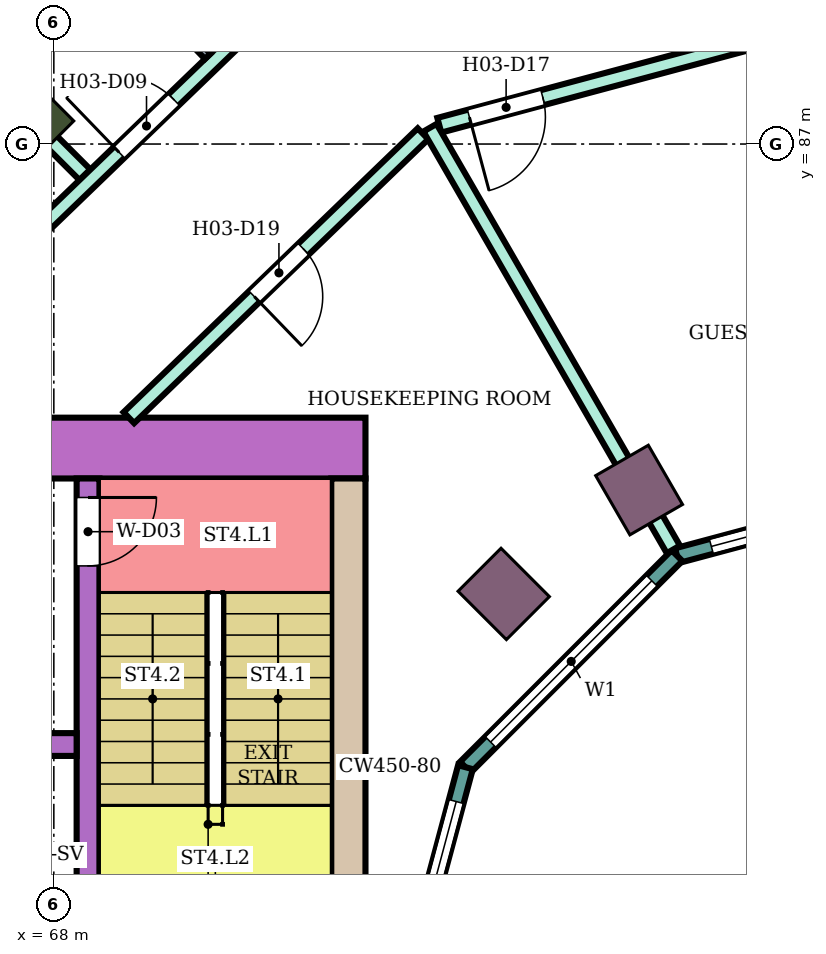
"""IFC4 building model, lengths in metres.
Left out: names, types, materials, properties, quantities, classifications, styles, units other than length and angle.
Written with IfcOpenShell. Run it as: python <this file> out.ifc"""

import sys

from ifc_helpers import new_model, si_unit, direction, frame, frame_2d, origin, origin_2d, place, context, subcontext, project, spatial, rectangle, extrude, element, fill, save


model = new_model("IFC4")
c1 = context("Model", 3, precision=1e-05, world=origin(), true_north=direction((0.0, 1.0)))
c2 = subcontext(c1, "Body", "Model", "MODEL_VIEW")
j1 = project(units=[si_unit("LENGTHUNIT", "METRE"), si_unit("PLANEANGLEUNIT", "RADIAN")], contexts=[c1])
p1 = place(None, origin())
s1 = spatial("IfcSite", under=j1, at=p1, CompositionType="ELEMENT")
p2 = place(p1, origin())
s2 = spatial("IfcBuilding", under=s1, at=p2, CompositionType="ELEMENT")
p3 = place(p2, frame((0.0, 0.0, 59.2)))
s3 = spatial("IfcBuildingStorey", under=s2, at=p3, CompositionType="ELEMENT", Elevation=59.2)
p4 = place(p3, frame((67.555, 87.445, 0.0), z_axis=(0.0, 0.0, 1.0), x_axis=(-0.707106781187, 0.707106781187, 0.0)))
e1 = element("IfcColumn", 1, at=p4, inside=s3, PredefinedType="COLUMN", context=c2, shape_type="SweptSolid", body=[
    extrude(rectangle(XDim=1.2, YDim=0.8, at=origin_2d()), origin(), (0.0, 0.0, 1.0), 3.8),
])
for number, where, z_axis, x_axis in (
    (2, (75.7, 82.448, 0.0), (0.0, 0.0, 1.0), (-0.5, 0.866, 0.0)),
    (3, (73.919, 81.081, 0.0), (0.0, 0.0, 1.0), (-0.707, 0.707, 0.0)),
):
    element("IfcColumn", number, at=place(p3, frame(where, z_axis=z_axis, x_axis=x_axis)), inside=s3, PredefinedType="COLUMN", context=c2, shape_type="SweptSolid", body=[
        extrude(rectangle(XDim=0.9, YDim=0.8, at=origin_2d()), origin(), (0.0, 0.0, 1.0), 3.8),
    ])
p5 = place(p3, frame((72.1, 83.0, 0.0), z_axis=(0.0, 0.0, 1.0), x_axis=(-1.0, 0.0, 0.0)))
e4 = element("IfcWall", 4, at=p5, inside=s3, PredefinedType="SHEAR", context=c2, shape_type="SweptSolid", body=[
    extrude(rectangle(XDim=14.7, YDim=0.8, at=frame_2d((7.35, 0.0))), origin(), (0.0, 0.0, 1.0), 3.48),
])
p6 = place(p5, frame((4.2, 0.0, 0.0)))
e5 = element("IfcOpeningElement", 5, at=p6, cuts=e4, PredefinedType="OPENING", context=c2, shape_type="SweptSolid", body=[
    extrude(rectangle(XDim=2.4, YDim=2.4, at=frame_2d((1.2, 1.2))), frame((0.0, 0.41, 0.0), z_axis=(0.0, -1.0, 0.0), x_axis=(1.0, 0.0, 0.0)), (0.0, 0.0, 1.0), 0.82),
])
p7 = place(p3, frame((71.875, 82.6, 0.0), z_axis=(0.0, 0.0, 1.0), x_axis=(0.0, -1.0, 0.0)))
e6 = element("IfcWall", 6, at=p7, inside=s3, PredefinedType="SHEAR", context=c2, shape_type="SweptSolid", body=[
    extrude(rectangle(XDim=7.6, YDim=0.45, at=frame_2d((3.8, 0.0))), origin(), (0.0, 0.0, 1.0), 3.48),
])
p8 = place(p3, frame((68.45, 82.6, 0.0), z_axis=(0.0, 0.0, 1.0), x_axis=(0.0, -1.0, 0.0)))
e7 = element("IfcWall", 7, at=p8, inside=s3, PredefinedType="SHEAR", context=c2, shape_type="SweptSolid", body=[
    extrude(rectangle(XDim=7.6, YDim=0.3, at=frame_2d((3.8, 0.0))), origin(), (0.0, 0.0, 1.0), 3.48),
])
p9 = place(p8, frame((0.25, 0.0, 0.0)))
e8 = element("IfcOpeningElement", 8, at=p9, cuts=e7, PredefinedType="OPENING", context=c2, shape_type="SweptSolid", body=[
    extrude(rectangle(XDim=0.9, YDim=2.1, at=frame_2d((0.45, 1.05))), frame((0.0, 0.16, 0.0), z_axis=(0.0, -1.0, 0.0), x_axis=(1.0, 0.0, 0.0)), (0.0, 0.0, 1.0), 0.32),
])
p10 = place(p3, frame((68.3, 79.1, 0.0), z_axis=(0.0, 0.0, 1.0), x_axis=(-1.0, 0.0, 0.0)))
e9 = element("IfcWall", 9, at=p10, inside=s3, PredefinedType="SHEAR", context=c2, shape_type="SweptSolid", body=[
    extrude(rectangle(XDim=10.9, YDim=0.3, at=frame_2d((5.45, 0.0))), origin(), (0.0, 0.0, 1.0), 3.48),
])
p11 = place(p10, frame((0.4, 0.0, 0.0)))
e10 = element("IfcOpeningElement", 10, at=p11, cuts=e9, PredefinedType="OPENING", context=c2, shape_type="SweptSolid", body=[
    extrude(rectangle(XDim=1.4, YDim=2.1, at=frame_2d((0.7, 1.05))), frame((0.0, 0.16, 0.0), z_axis=(0.0, -1.0, 0.0), x_axis=(1.0, 0.0, 0.0)), (0.0, 0.0, 1.0), 0.32),
])
p12 = place(p10, frame((5.4, 0.0, 0.0)))
e11 = element("IfcOpeningElement", 11, at=p12, cuts=e9, PredefinedType="OPENING", context=c2, shape_type="SweptSolid", body=[
    extrude(rectangle(XDim=1.4, YDim=2.1, at=frame_2d((0.7, 1.05))), frame((0.0, 0.16, 0.0), z_axis=(0.0, -1.0, 0.0), x_axis=(1.0, 0.0, 0.0)), (0.0, 0.0, 1.0), 0.32),
])
p13 = place(p10, frame((8.1, 0.0, 0.0)))
e12 = element("IfcOpeningElement", 12, at=p13, cuts=e9, PredefinedType="OPENING", context=c2, shape_type="SweptSolid", body=[
    extrude(rectangle(XDim=1.0, YDim=2.1, at=frame_2d((0.5, 1.05))), frame((0.0, 0.16, 0.0), z_axis=(0.0, -1.0, 0.0), x_axis=(1.0, 0.0, 0.0)), (0.0, 0.0, 1.0), 0.32),
])
p14 = place(p3, frame((80.0, 82.604, 0.0), z_axis=(0.0, 0.0, 1.0), x_axis=(-0.965933654434, -0.258789828301, 0.0)))
e13 = element("IfcWall", 13, at=p14, inside=s3, PredefinedType="NOTDEFINED", context=c2, shape_type="SweptSolid", body=[
    extrude(rectangle(XDim=3.936, YDim=0.2, at=frame_2d((1.968, 0.0))), origin(), (0.0, 0.0, 1.0), 3.8),
])
p15 = place(p14, frame((0.468, 0.0, 0.9)))
e14 = element("IfcOpeningElement", 14, at=p15, cuts=e13, PredefinedType="OPENING", context=c2, shape_type="SweptSolid", body=[
    extrude(rectangle(XDim=3.0, YDim=2.3, at=frame_2d((1.5, 1.15))), frame((0.0, 0.11, 0.0), z_axis=(0.0, -1.0, 0.0), x_axis=(1.0, 0.0, 0.0)), (0.0, 0.0, 1.0), 0.22),
])
p16 = place(p3, frame((76.198, 81.585, 0.0), z_axis=(0.0, 0.0, 1.0), x_axis=(-0.707106781187, -0.707106781187, 0.0)))
e15 = element("IfcWall", 15, at=p16, inside=s3, PredefinedType="NOTDEFINED", context=c2, shape_type="SweptSolid", body=[
    extrude(rectangle(XDim=3.936, YDim=0.2, at=frame_2d((1.968, 0.0))), origin(), (0.0, 0.0, 1.0), 3.8),
])
p17 = place(p16, frame((0.468, 0.0, 0.9)))
e16 = element("IfcOpeningElement", 16, at=p17, cuts=e15, PredefinedType="OPENING", context=c2, shape_type="SweptSolid", body=[
    extrude(rectangle(XDim=3.0, YDim=2.3, at=frame_2d((1.5, 1.15))), frame((0.0, 0.11, 0.0), z_axis=(0.0, -1.0, 0.0), x_axis=(1.0, 0.0, 0.0)), (0.0, 0.0, 1.0), 0.22),
])
p18 = place(p3, frame((73.415, 78.802, 0.0), z_axis=(0.0, 0.0, 1.0), x_axis=(-0.258789828301, -0.965933654434, 0.0)))
e17 = element("IfcWall", 17, at=p18, inside=s3, PredefinedType="NOTDEFINED", context=c2, shape_type="SweptSolid", body=[
    extrude(rectangle(XDim=3.936, YDim=0.2, at=frame_2d((1.968, 0.0))), origin(), (0.0, 0.0, 1.0), 3.8),
])
p19 = place(p18, frame((0.468, 0.0, 0.9)))
e18 = element("IfcOpeningElement", 18, at=p19, cuts=e17, PredefinedType="OPENING", context=c2, shape_type="SweptSolid", body=[
    extrude(rectangle(XDim=3.0, YDim=2.3, at=frame_2d((1.5, 1.15))), frame((0.0, 0.11, 0.0), z_axis=(0.0, -1.0, 0.0), x_axis=(1.0, 0.0, 0.0)), (0.0, 0.0, 1.0), 0.22),
])
p20 = place(p3, frame((63.598, 91.408, 0.0), z_axis=(0.0, 0.0, 1.0), x_axis=(0.706999146394, -0.707214399597, 0.0)))
e19 = element("IfcWall", 19, at=p20, inside=s3, PredefinedType="PARTITIONING", context=c2, shape_type="SweptSolid", body=[
    extrude(rectangle(XDim=6.805, YDim=0.2, at=frame_2d((3.403, 0.0))), origin(), (0.0, 0.0, 1.0), 3.35),
])
p21 = place(p3, frame((66.797, 84.9, 0.0), z_axis=(0.0, 0.0, 1.0), x_axis=(0.719692092412, 0.694293376116, 0.0)))
e20 = element("IfcWall", 20, at=p21, inside=s3, PredefinedType="PARTITIONING", context=c2, shape_type="SweptSolid", body=[
    extrude(rectangle(XDim=6.584, YDim=0.2, at=frame_2d((3.292, 0.0))), origin(), (0.0, 0.0, 1.0), 3.35),
])
p22 = place(p21, frame((2.866, 0.0, 0.0)))
e21 = element("IfcOpeningElement", 21, at=p22, cuts=e20, PredefinedType="OPENING", context=c2, shape_type="SweptSolid", body=[
    extrude(rectangle(XDim=1.0, YDim=2.1, at=frame_2d((0.5, 1.05))), frame((0.0, 0.11, 0.0), z_axis=(0.0, -1.0, 0.0), x_axis=(1.0, 0.0, 0.0)), (0.0, 0.0, 1.0), 0.22),
])
p23 = place(p3, frame((68.987, 83.4, 0.0), z_axis=(0.0, 0.0, 1.0), x_axis=(0.719547721855, 0.694442996922, 0.0)))
e22 = element("IfcWall", 22, at=p23, inside=s3, PredefinedType="PARTITIONING", context=c2, shape_type="SweptSolid", body=[
    extrude(rectangle(XDim=5.378, YDim=0.2, at=frame_2d((2.689, 0.0))), origin(), (0.0, 0.0, 1.0), 3.35),
])
p24 = place(p23, frame((2.294, 0.0, 0.0)))
e23 = element("IfcOpeningElement", 23, at=p24, cuts=e22, PredefinedType="OPENING", context=c2, shape_type="SweptSolid", body=[
    extrude(rectangle(XDim=0.9, YDim=2.1, at=frame_2d((0.45, 1.05))), frame((0.0, 0.11, 0.0), z_axis=(0.0, -1.0, 0.0), x_axis=(1.0, 0.0, 0.0)), (0.0, 0.0, 1.0), 0.22),
])
p25 = place(p3, frame((73.071, 87.247, 0.0), z_axis=(0.0, 0.0, 1.0), x_axis=(0.965931651205, 0.258797305243, 0.0)))
e24 = element("IfcWall", 24, at=p25, inside=s3, PredefinedType="PARTITIONING", context=c2, shape_type="SweptSolid", body=[
    extrude(rectangle(XDim=7.043, YDim=0.2, at=frame_2d((3.521, 0.0))), origin(), (0.0, 0.0, 1.0), 3.35),
])
p26 = place(p25, frame((0.41, 0.0, 0.0)))
e25 = element("IfcOpeningElement", 25, at=p26, cuts=e24, PredefinedType="OPENING", context=c2, shape_type="SweptSolid", body=[
    extrude(rectangle(XDim=1.0, YDim=2.1, at=frame_2d((0.5, 1.05))), frame((0.0, 0.11, 0.0), z_axis=(0.0, -1.0, 0.0), x_axis=(1.0, 0.0, 0.0)), (0.0, 0.0, 1.0), 0.22),
])
p27 = place(p3, frame((72.949, 87.214, 0.0), z_axis=(0.0, 0.0, 1.0), x_axis=(0.499927021214, -0.866067534006, 0.0)))
e26 = element("IfcWall", 26, at=p27, inside=s3, PredefinedType="PARTITIONING", context=c2, shape_type="SweptSolid", body=[
    extrude(rectangle(XDim=6.405, YDim=0.2, at=frame_2d((3.203, 0.0))), origin(), (0.0, 0.0, 1.0), 3.35),
])
p28 = place(p3, frame((68.185, 90.06, 0.0), z_axis=(0.0, 0.0, 1.0), x_axis=(0.69446127412, -0.719530081892, 0.0)))
e27 = element("IfcWall", 27, at=p28, inside=s3, PredefinedType="PARTITIONING", context=c2, shape_type="SweptSolid", body=[
    extrude(rectangle(XDim=2.649, YDim=0.1, at=frame_2d((1.324, 0.0))), origin(), (0.0, 0.0, 1.0), 3.35),
])
p29 = place(p28, frame((0.95, 0.0, 0.0)))
e28 = element("IfcOpeningElement", 28, at=p29, cuts=e27, PredefinedType="OPENING", context=c2, shape_type="SweptSolid", body=[
    extrude(rectangle(XDim=0.8, YDim=2.1, at=frame_2d((0.4, 1.05))), frame((0.0, 0.06, 0.0), z_axis=(0.0, -1.0, 0.0), x_axis=(1.0, 0.0, 0.0)), (0.0, 0.0, 1.0), 0.12),
])
p30 = place(p15, origin())
e29 = element("IfcWindow", 29, at=p30, inside=s3, PartitioningType="SINGLE_PANEL", PredefinedType="WINDOW", context=c2, shape_type="SweptSolid", body=[
    extrude(rectangle(XDim=3.0, YDim=2.3, at=frame_2d((1.5, 1.15))), frame((0.0, 0.03, 0.0), z_axis=(0.0, -1.0, 0.0), x_axis=(1.0, 0.0, 0.0)), (0.0, 0.0, 1.0), 0.06),
])
fill(e14, e29)
p31 = place(p17, origin())
e30 = element("IfcWindow", 30, at=p31, inside=s3, PartitioningType="SINGLE_PANEL", PredefinedType="WINDOW", context=c2, shape_type="SweptSolid", body=[
    extrude(rectangle(XDim=3.0, YDim=2.3, at=frame_2d((1.5, 1.15))), frame((0.0, 0.03, 0.0), z_axis=(0.0, -1.0, 0.0), x_axis=(1.0, 0.0, 0.0)), (0.0, 0.0, 1.0), 0.06),
])
fill(e16, e30)
p32 = place(p19, origin())
e31 = element("IfcWindow", 31, at=p32, inside=s3, PartitioningType="SINGLE_PANEL", PredefinedType="WINDOW", context=c2, shape_type="SweptSolid", body=[
    extrude(rectangle(XDim=3.0, YDim=2.3, at=frame_2d((1.5, 1.15))), frame((0.0, 0.03, 0.0), z_axis=(0.0, -1.0, 0.0), x_axis=(1.0, 0.0, 0.0)), (0.0, 0.0, 1.0), 0.06),
])
fill(e18, e31)
p33 = place(p22, origin())
e32 = element("IfcDoor", 32, at=p33, inside=s3, OperationType="SINGLE_SWING_LEFT", PredefinedType="DOOR", context=c2, shape_type="SweptSolid", body=[
    extrude(rectangle(XDim=1.0, YDim=2.1, at=frame_2d((0.5, 1.05))), frame((0.0, 0.025, 0.0), z_axis=(0.0, -1.0, 0.0), x_axis=(1.0, 0.0, 0.0)), (0.0, 0.0, 1.0), 0.05),
])
fill(e21, e32)
p34 = place(p26, frame((1.0, 0.0, 0.0), z_axis=(0.0, 0.0, 1.0), x_axis=(-1.0, 0.0, 0.0)))
e33 = element("IfcDoor", 33, at=p34, inside=s3, OperationType="SINGLE_SWING_RIGHT", PredefinedType="DOOR", context=c2, shape_type="SweptSolid", body=[
    extrude(rectangle(XDim=1.0, YDim=2.1, at=frame_2d((0.5, 1.05))), frame((0.0, 0.025, 0.0), z_axis=(0.0, -1.0, 0.0), x_axis=(1.0, 0.0, 0.0)), (0.0, 0.0, 1.0), 0.05),
])
fill(e25, e33)
p35 = place(p24, frame((0.9, 0.0, 0.0), z_axis=(0.0, 0.0, 1.0), x_axis=(-1.0, 0.0, 0.0)))
e34 = element("IfcDoor", 34, at=p35, inside=s3, OperationType="SINGLE_SWING_RIGHT", PredefinedType="DOOR", context=c2, shape_type="SweptSolid", body=[
    extrude(rectangle(XDim=0.9, YDim=2.1, at=frame_2d((0.45, 1.05))), frame((0.0, 0.025, 0.0), z_axis=(0.0, -1.0, 0.0), x_axis=(1.0, 0.0, 0.0)), (0.0, 0.0, 1.0), 0.05),
])
fill(e23, e34)
p36 = place(p9, origin())
e35 = element("IfcDoor", 35, at=p36, inside=s3, OperationType="SINGLE_SWING_LEFT", PredefinedType="DOOR", context=c2, shape_type="SweptSolid", body=[
    extrude(rectangle(XDim=0.9, YDim=2.1, at=frame_2d((0.45, 1.05))), frame((0.0, 0.025, 0.0), z_axis=(0.0, -1.0, 0.0), x_axis=(1.0, 0.0, 0.0)), (0.0, 0.0, 1.0), 0.05),
])
fill(e8, e35)
save(model, sys.argv[1])
